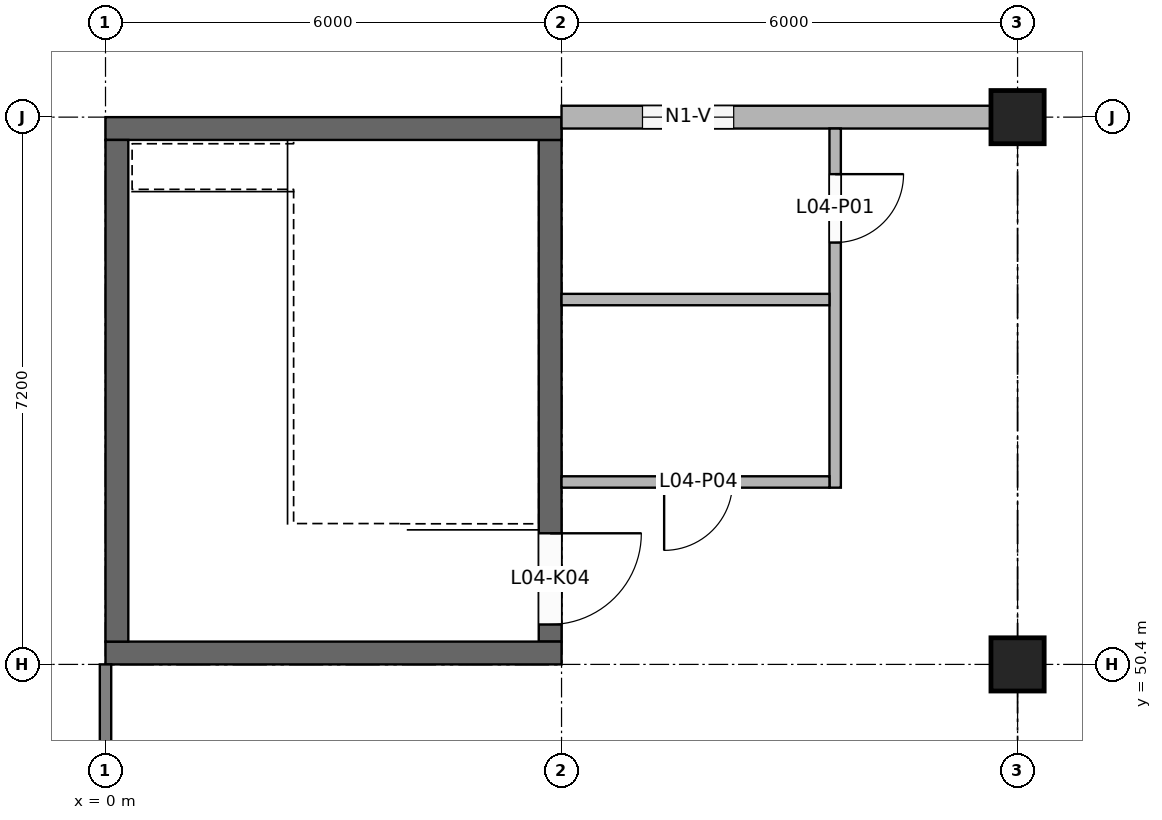
"""IFC4 building model, lengths in metres.
Left out: names, types, materials, properties, quantities, classifications, styles, units other than length and angle.
Written with IfcOpenShell. Run it as: python <this file> out.ifc"""

import sys

from ifc_helpers import new_model, si_unit, direction, frame, frame_2d, origin, origin_2d, place, context, subcontext, project, spatial, rectangle, extrude, element, fill, save


model = new_model("IFC4")
c1 = context("Model", 3, precision=1e-05, world=origin(), true_north=direction((0.0, 1.0)))
c2 = subcontext(c1, "Body", "Model", "MODEL_VIEW")
j1 = project(units=[si_unit("LENGTHUNIT", "METRE"), si_unit("PLANEANGLEUNIT", "RADIAN")], contexts=[c1])
p1 = place(None, origin())
s1 = spatial("IfcSite", under=j1, at=p1, CompositionType="ELEMENT")
p2 = place(p1, origin())
s2 = spatial("IfcBuilding", under=s1, at=p2, CompositionType="ELEMENT")
p3 = place(p2, frame((0.0, 0.0, 16.8)))
s3 = spatial("IfcBuildingStorey", under=s2, at=p3, CompositionType="ELEMENT", Elevation=16.8)
for number, where, z_axis, x_axis in (
    (1, (0.0, 50.55, 0.0), (0.0, 0.0, 1.0), (1.0, 0.0, 0.0)),
    (2, (0.0, 57.45, 0.0), (0.0, 0.0, 1.0), (1.0, 0.0, 0.0)),
):
    element("IfcWall", number, at=place(p3, frame(where, z_axis=z_axis, x_axis=x_axis)), inside=s3, PredefinedType="SHEAR", context=c2, shape_type="SweptSolid", body=[
        extrude(rectangle(XDim=6.0, YDim=0.3, at=frame_2d((3.0, 0.0))), origin(), (0.0, 0.0, 1.0), 3.95),
    ])
p4 = place(p3, frame((0.15, 50.7, 0.0), z_axis=(0.0, 0.0, 1.0), x_axis=(0.0, 1.0, 0.0)))
e3 = element("IfcWall", 3, at=p4, inside=s3, PredefinedType="SHEAR", context=c2, shape_type="SweptSolid", body=[
    extrude(rectangle(XDim=6.6, YDim=0.3, at=frame_2d((3.3, 0.0))), origin(), (0.0, 0.0, 1.0), 3.95),
])
p5 = place(p3, frame((5.85, 50.7, 0.0), z_axis=(0.0, 0.0, 1.0), x_axis=(0.0, 1.0, 0.0)))
e4 = element("IfcWall", 4, at=p5, inside=s3, PredefinedType="SHEAR", context=c2, shape_type="SweptSolid", body=[
    extrude(rectangle(XDim=6.6, YDim=0.3, at=frame_2d((3.3, 0.0))), origin(), (0.0, 0.0, 1.0), 3.95),
])
p6 = place(p5, frame((0.225, 0.0, 0.0)))
e5 = element("IfcOpeningElement", 5, at=p6, cuts=e4, PredefinedType="OPENING", context=c2, shape_type="SweptSolid", body=[
    extrude(rectangle(XDim=1.2, YDim=2.1, at=frame_2d((0.6, 1.05))), frame((0.0, 0.16, 0.0), z_axis=(0.0, -1.0, 0.0), x_axis=(1.0, 0.0, 0.0)), (0.0, 0.0, 1.0), 0.32),
])
for number, where, z_axis, x_axis in (
    (6, (12.0, 50.4, 0.0), (0.0, 0.0, 1.0), (1.0, 0.0, 0.0)),
    (7, (12.0, 57.6, 0.0), (0.0, 0.0, 1.0), (1.0, 0.0, 0.0)),
):
    element("IfcColumn", number, at=place(p3, frame(where, z_axis=z_axis, x_axis=x_axis)), inside=s3, PredefinedType="COLUMN", context=c2, shape_type="SweptSolid", body=[
        extrude(rectangle(XDim=0.7, YDim=0.7, at=origin_2d()), origin(), (0.0, 0.0, 1.0), 3.95),
    ])
p7 = place(p3, frame((6.0, 57.6, 0.0), z_axis=(0.0, 0.0, 1.0), x_axis=(1.0, 0.0, 0.0)))
e8 = element("IfcWall", 8, at=p7, inside=s3, PredefinedType="SOLIDWALL", context=c2, shape_type="SweptSolid", body=[
    extrude(rectangle(XDim=5.65, YDim=0.3, at=frame_2d((2.825, 0.0))), origin(), (0.0, 0.0, 1.0), 3.15),
])
p8 = place(p7, frame((1.065, 0.0, 0.9)))
e9 = element("IfcOpeningElement", 9, at=p8, cuts=e8, PredefinedType="OPENING", context=c2, shape_type="SweptSolid", body=[
    extrude(rectangle(XDim=1.2, YDim=1.5, at=frame_2d((0.6, 0.75))), frame((0.0, 0.16, 0.0), z_axis=(0.0, -1.0, 0.0), x_axis=(1.0, 0.0, 0.0)), (0.0, 0.0, 1.0), 0.32),
])
p9 = place(p3, frame((9.6, 52.725, 0.0), z_axis=(0.0, 0.0, 1.0), x_axis=(0.0, 1.0, 0.0)))
e10 = element("IfcWall", 10, at=p9, inside=s3, PredefinedType="PARTITIONING", context=c2, shape_type="SweptSolid", body=[
    extrude(rectangle(XDim=4.725, YDim=0.15, at=frame_2d((2.362, 0.0))), origin(), (0.0, 0.0, 1.0), 3.15),
])
p10 = place(p9, frame((3.225, 0.0, 0.0)))
e11 = element("IfcOpeningElement", 11, at=p10, cuts=e10, PredefinedType="OPENING", context=c2, shape_type="SweptSolid", body=[
    extrude(rectangle(XDim=0.9, YDim=2.1, at=frame_2d((0.45, 1.05))), frame((0.0, 0.085, 0.0), z_axis=(0.0, -1.0, 0.0), x_axis=(1.0, 0.0, 0.0)), (0.0, 0.0, 1.0), 0.17),
])
p11 = place(p3, frame((6.0, 52.8, 0.0), z_axis=(0.0, 0.0, 1.0), x_axis=(1.0, 0.0, 0.0)))
e12 = element("IfcWall", 12, at=p11, inside=s3, PredefinedType="PARTITIONING", context=c2, shape_type="SweptSolid", body=[
    extrude(rectangle(XDim=3.525, YDim=0.15, at=frame_2d((1.762, 0.0))), origin(), (0.0, 0.0, 1.0), 3.95),
])
p12 = place(p11, frame((1.35, 0.0, 0.0)))
e13 = element("IfcOpeningElement", 13, at=p12, cuts=e12, PredefinedType="OPENING", context=c2, shape_type="SweptSolid", body=[
    extrude(rectangle(XDim=0.9, YDim=2.1, at=frame_2d((0.45, 1.05))), frame((0.0, 0.085, 0.0), z_axis=(0.0, -1.0, 0.0), x_axis=(1.0, 0.0, 0.0)), (0.0, 0.0, 1.0), 0.17),
])
p13 = place(p3, frame((6.0, 55.2, 0.0), z_axis=(0.0, 0.0, 1.0), x_axis=(1.0, 0.0, 0.0)))
e14 = element("IfcWall", 14, at=p13, inside=s3, PredefinedType="PARTITIONING", context=c2, shape_type="SweptSolid", body=[
    extrude(rectangle(XDim=3.525, YDim=0.15, at=frame_2d((1.762, 0.0))), origin(), (0.0, 0.0, 1.0), 3.95),
])
p14 = place(p8, origin())
e15 = element("IfcWindow", 15, at=p14, inside=s3, PartitioningType="SINGLE_PANEL", PredefinedType="WINDOW", context=c2, shape_type="SweptSolid", body=[
    extrude(rectangle(XDim=1.2, YDim=1.5, at=frame_2d((0.6, 0.75))), frame((0.0, 0.03, 0.0), z_axis=(0.0, -1.0, 0.0), x_axis=(1.0, 0.0, 0.0)), (0.0, 0.0, 1.0), 0.06),
])
fill(e9, e15)
p15 = place(p6, frame((1.2, 0.0, 0.0), z_axis=(0.0, 0.0, 1.0), x_axis=(-1.0, 0.0, 0.0)))
e16 = element("IfcDoor", 16, at=p15, inside=s3, OperationType="SINGLE_SWING_LEFT", PredefinedType="DOOR", context=c2, shape_type="SweptSolid", body=[
    extrude(rectangle(XDim=1.2, YDim=2.1, at=frame_2d((0.6, 1.05))), frame((0.0, 0.025, 0.0), z_axis=(0.0, -1.0, 0.0), x_axis=(1.0, 0.0, 0.0)), (0.0, 0.0, 1.0), 0.05),
])
fill(e5, e16)
p16 = place(p10, frame((0.9, 0.0, 0.0), z_axis=(0.0, 0.0, 1.0), x_axis=(-1.0, 0.0, 0.0)))
e17 = element("IfcDoor", 17, at=p16, inside=s3, OperationType="SINGLE_SWING_LEFT", PredefinedType="DOOR", context=c2, shape_type="SweptSolid", body=[
    extrude(rectangle(XDim=0.9, YDim=2.1, at=frame_2d((0.45, 1.05))), frame((0.0, 0.025, 0.0), z_axis=(0.0, -1.0, 0.0), x_axis=(1.0, 0.0, 0.0)), (0.0, 0.0, 1.0), 0.05),
])
fill(e11, e17)
p17 = place(p12, frame((0.9, 0.0, 0.0), z_axis=(0.0, 0.0, 1.0), x_axis=(-1.0, 0.0, 0.0)))
e18 = element("IfcDoor", 18, at=p17, inside=s3, OperationType="SINGLE_SWING_RIGHT", PredefinedType="DOOR", context=c2, shape_type="SweptSolid", body=[
    extrude(rectangle(XDim=0.9, YDim=2.1, at=frame_2d((0.45, 1.05))), frame((0.0, 0.025, 0.0), z_axis=(0.0, -1.0, 0.0), x_axis=(1.0, 0.0, 0.0)), (0.0, 0.0, 1.0), 0.05),
])
fill(e13, e18)
save(model, sys.argv[1])
